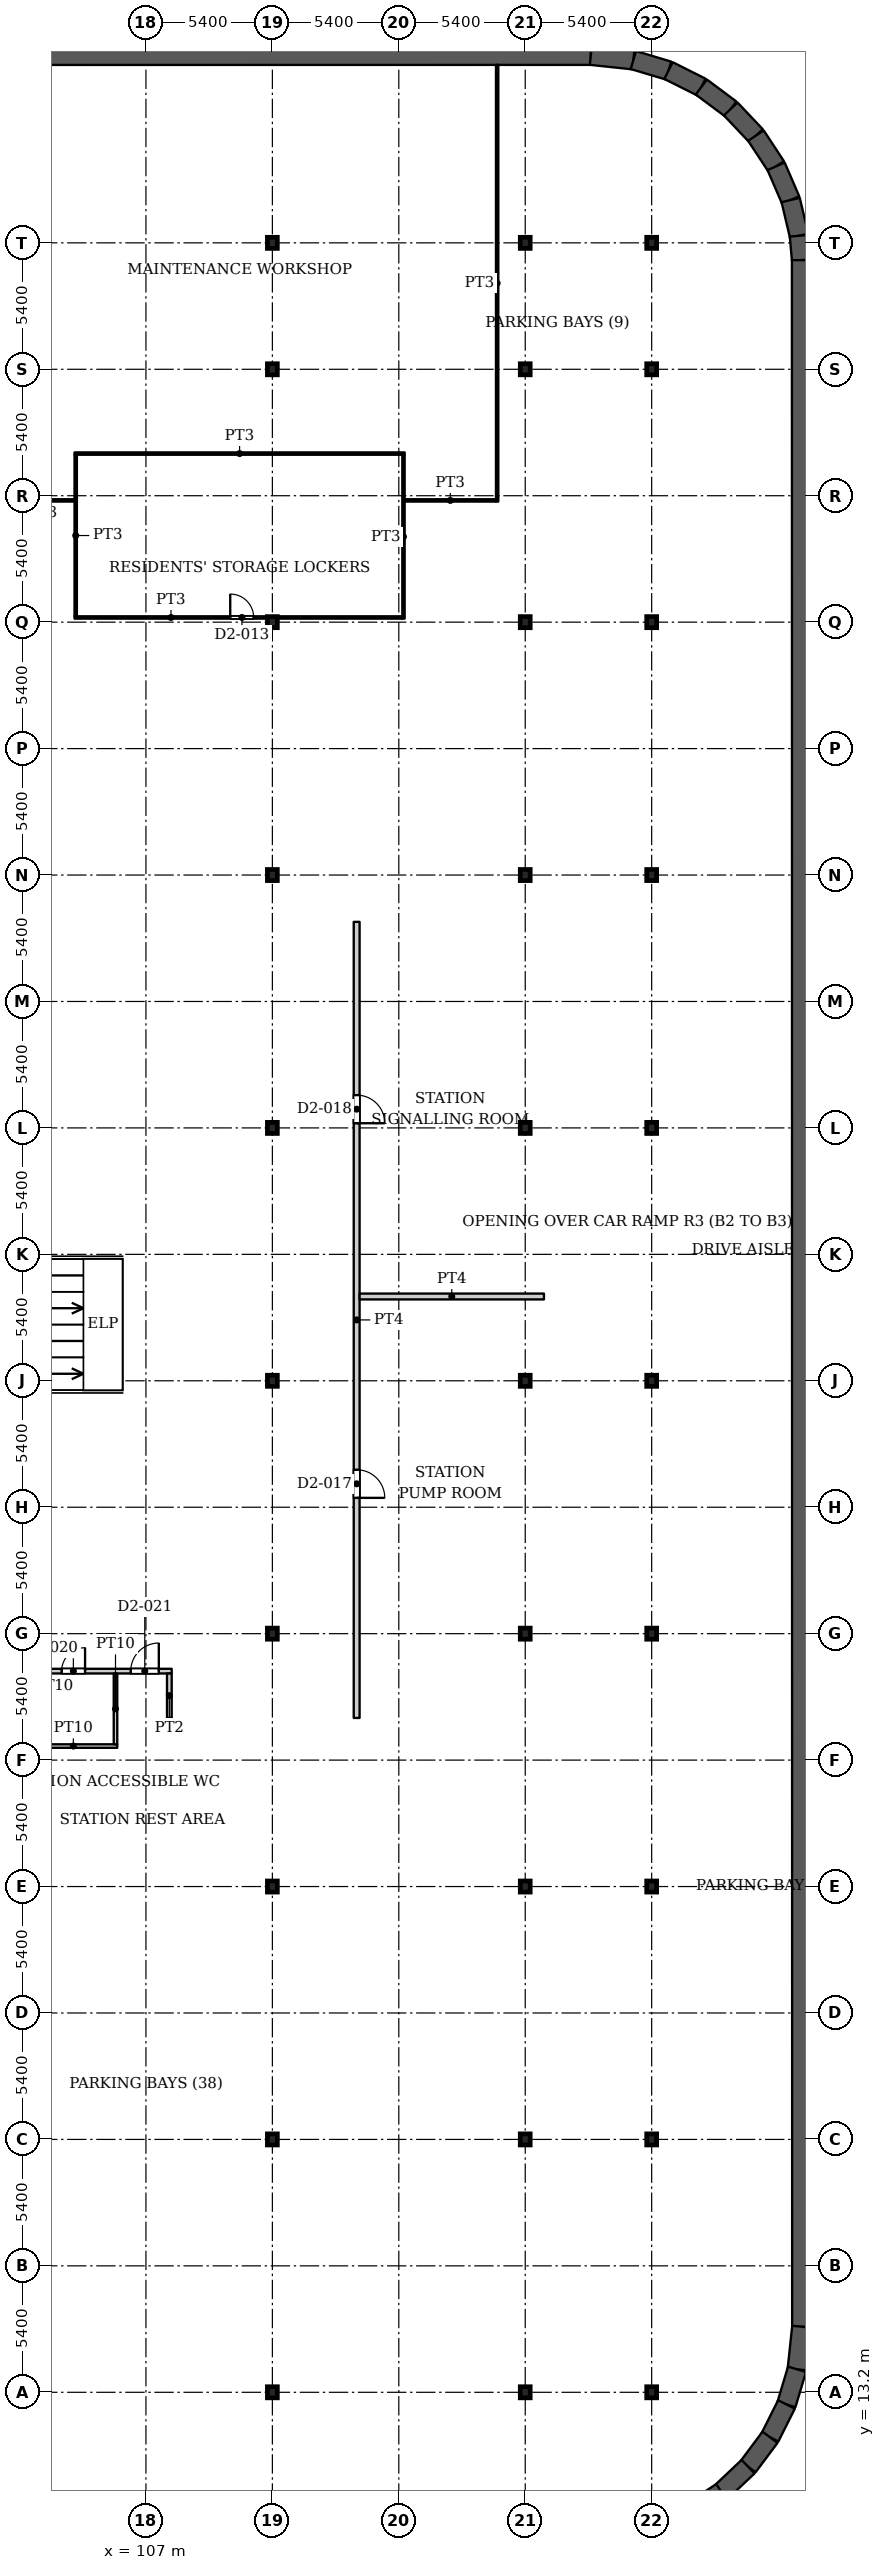
"""IFC4 building model, lengths in metres.
Left out: names, types, materials, properties, quantities, classifications, styles, units other than length and angle.
Written with IfcOpenShell. Run it as: python <this file> out.ifc"""

import sys

from ifc_helpers import new_model, si_unit, direction, frame, frame_2d, origin, origin_2d, place, context, subcontext, project, spatial, rectangle, i_section, extrude, source, transform, mapped, element, fill, save


model = new_model("IFC4")
c1 = context("Model", 3, precision=1e-05, world=origin(), true_north=direction((0.0, 1.0)))
c2 = subcontext(c1, "Body", "Model", "MODEL_VIEW")
j1 = project(units=[si_unit("LENGTHUNIT", "METRE"), si_unit("PLANEANGLEUNIT", "RADIAN")], contexts=[c1])
p1 = place(None, origin())
s1 = spatial("IfcSite", under=j1, at=p1, CompositionType="ELEMENT")
p2 = place(p1, origin())
s2 = spatial("IfcBuilding", under=s1, at=p2, CompositionType="ELEMENT")
p3 = place(p2, frame((0.0, 0.0, -10.0)))
s3 = spatial("IfcBuildingStorey", under=s2, at=p3, CompositionType="ELEMENT", Elevation=-10.0)
for number, where, z_axis, x_axis in (
    (1, (112.4, 13.2, 0.0), (0.0, 0.0, 1.0), (1.0, 0.0, 0.0)),
    (2, (123.2, 13.2, 0.0), (0.0, 0.0, 1.0), (1.0, 0.0, 0.0)),
    (3, (128.6, 13.2, 0.0), (0.0, 0.0, 1.0), (1.0, 0.0, 0.0)),
    (4, (112.4, 24.0, 0.0), (0.0, 0.0, 1.0), (1.0, 0.0, 0.0)),
    (5, (123.2, 24.0, 0.0), (0.0, 0.0, 1.0), (1.0, 0.0, 0.0)),
    (6, (128.6, 24.0, 0.0), (0.0, 0.0, 1.0), (1.0, 0.0, 0.0)),
    (7, (112.4, 34.8, 0.0), (0.0, 0.0, 1.0), (1.0, 0.0, 0.0)),
    (8, (123.2, 34.8, 0.0), (0.0, 0.0, 1.0), (1.0, 0.0, 0.0)),
    (9, (128.6, 34.8, 0.0), (0.0, 0.0, 1.0), (1.0, 0.0, 0.0)),
    (10, (112.4, 45.6, 0.0), (0.0, 0.0, 1.0), (1.0, 0.0, 0.0)),
    (11, (123.2, 45.6, 0.0), (0.0, 0.0, 1.0), (1.0, 0.0, 0.0)),
    (12, (128.6, 45.6, 0.0), (0.0, 0.0, 1.0), (1.0, 0.0, 0.0)),
    (13, (112.4, 56.4, 0.0), (0.0, 0.0, 1.0), (1.0, 0.0, 0.0)),
    (14, (123.2, 56.4, 0.0), (0.0, 0.0, 1.0), (1.0, 0.0, 0.0)),
    (15, (128.6, 56.4, 0.0), (0.0, 0.0, 1.0), (1.0, 0.0, 0.0)),
    (16, (112.4, 67.2, 0.0), (0.0, 0.0, 1.0), (1.0, 0.0, 0.0)),
    (17, (123.2, 67.2, 0.0), (0.0, 0.0, 1.0), (1.0, 0.0, 0.0)),
    (18, (128.6, 67.2, 0.0), (0.0, 0.0, 1.0), (1.0, 0.0, 0.0)),
    (19, (112.4, 78.0, 0.0), (0.0, 0.0, 1.0), (1.0, 0.0, 0.0)),
    (20, (123.2, 78.0, 0.0), (0.0, 0.0, 1.0), (1.0, 0.0, 0.0)),
    (21, (128.6, 78.0, 0.0), (0.0, 0.0, 1.0), (1.0, 0.0, 0.0)),
    (22, (112.4, 88.8, 0.0), (0.0, 0.0, 1.0), (1.0, 0.0, 0.0)),
    (23, (123.2, 88.8, 0.0), (0.0, 0.0, 1.0), (1.0, 0.0, 0.0)),
    (24, (128.6, 88.8, 0.0), (0.0, 0.0, 1.0), (1.0, 0.0, 0.0)),
    (25, (112.4, 99.6, 0.0), (0.0, 0.0, 1.0), (1.0, 0.0, 0.0)),
    (26, (123.2, 99.6, 0.0), (0.0, 0.0, 1.0), (1.0, 0.0, 0.0)),
    (27, (128.6, 99.6, 0.0), (0.0, 0.0, 1.0), (1.0, 0.0, 0.0)),
    (28, (112.4, 105.0, 0.0), (0.0, 0.0, 1.0), (1.0, 0.0, 0.0)),
    (29, (123.2, 105.0, 0.0), (0.0, 0.0, 1.0), (1.0, 0.0, 0.0)),
    (30, (128.6, 105.0, 0.0), (0.0, 0.0, 1.0), (1.0, 0.0, 0.0)),
):
    element("IfcColumn", number, at=place(p3, frame(where, z_axis=z_axis, x_axis=x_axis)), inside=s3, PredefinedType="COLUMN", context=c2, shape_type="SweptSolid", body=[
        extrude(i_section(OverallWidth=0.424, OverallDepth=0.474, WebThickness=0.048, FlangeThickness=0.077, FilletRadius=0.014, at=origin_2d()), origin(), (0.0, 0.0, 1.0), 5.0),
    ])
p4 = place(p3, frame((17.739, 112.989, 0.0), z_axis=(0.0, 0.0, 1.0), x_axis=(0.999999994851, 0.000101480029, 0.0)))
e31 = element("IfcWall", 31, at=p4, inside=s3, PredefinedType="SOLIDWALL", context=c2, shape_type="SweptSolid", body=[
    extrude(rectangle(XDim=108.261, YDim=0.8, at=frame_2d((54.13, 0.0))), origin(), (0.0, 0.0, 1.0), 5.0),
])
p5 = place(p3, frame((126.0, 113.0, 0.0), z_axis=(0.0, 0.0, 1.0), x_axis=(0.994412187849, -0.105567043429, 0.0)))
e32 = element("IfcWall", 32, at=p5, inside=s3, PredefinedType="SOLIDWALL", context=c2, shape_type="SweptSolid", body=[
    extrude(rectangle(XDim=1.829, YDim=0.8, at=frame_2d((0.915, 0.0))), origin(), (0.0, 0.0, 1.0), 5.0),
])
p6 = place(p3, frame((127.819, 112.807, 0.0), z_axis=(0.0, 0.0, 1.0), x_axis=(0.957886299092, -0.287147763375, 0.0)))
e33 = element("IfcWall", 33, at=p6, inside=s3, PredefinedType="SOLIDWALL", context=c2, shape_type="SweptSolid", body=[
    extrude(rectangle(XDim=1.567, YDim=0.8, at=frame_2d((0.783, 0.0))), origin(), (0.0, 0.0, 1.0), 5.0),
])
p7 = place(p3, frame((129.32, 112.357, 0.0), z_axis=(0.0, 0.0, 1.0), x_axis=(0.893803246399, -0.448459314462, 0.0)))
e34 = element("IfcWall", 34, at=p7, inside=s3, PredefinedType="SOLIDWALL", context=c2, shape_type="SweptSolid", body=[
    extrude(rectangle(XDim=1.567, YDim=0.8, at=frame_2d((0.784, 0.0))), origin(), (0.0, 0.0, 1.0), 5.0),
])
p8 = place(p3, frame((130.721, 111.654, 0.0), z_axis=(0.0, 0.0, 1.0), x_axis=(0.801771638905, -0.597630520512, 0.0)))
e35 = element("IfcWall", 35, at=p8, inside=s3, PredefinedType="SOLIDWALL", context=c2, shape_type="SweptSolid", body=[
    extrude(rectangle(XDim=1.568, YDim=0.8, at=frame_2d((0.784, 0.0))), origin(), (0.0, 0.0, 1.0), 5.0),
])
p9 = place(p3, frame((131.978, 110.717, 0.0), z_axis=(0.0, 0.0, 1.0), x_axis=(0.686641833089, -0.726995868662, 0.0)))
e36 = element("IfcWall", 36, at=p9, inside=s3, PredefinedType="SOLIDWALL", context=c2, shape_type="SweptSolid", body=[
    extrude(rectangle(XDim=1.567, YDim=0.8, at=frame_2d((0.783, 0.0))), origin(), (0.0, 0.0, 1.0), 5.0),
])
p10 = place(p3, frame((133.054, 109.578, 0.0), z_axis=(0.0, 0.0, 1.0), x_axis=(0.549333272834, -0.835603348101, 0.0)))
e37 = element("IfcWall", 37, at=p10, inside=s3, PredefinedType="SOLIDWALL", context=c2, shape_type="SweptSolid", body=[
    extrude(rectangle(XDim=1.568, YDim=0.8, at=frame_2d((0.784, 0.0))), origin(), (0.0, 0.0, 1.0), 5.0),
])
p11 = place(p3, frame((133.915, 108.268, 0.0), z_axis=(0.0, 0.0, 1.0), x_axis=(0.396155493925, -0.918183437355, 0.0)))
e38 = element("IfcWall", 38, at=p11, inside=s3, PredefinedType="SOLIDWALL", context=c2, shape_type="SweptSolid", body=[
    extrude(rectangle(XDim=1.567, YDim=0.8, at=frame_2d((0.784, 0.0))), origin(), (0.0, 0.0, 1.0), 5.0),
])
p12 = place(p3, frame((134.536, 106.829, 0.0), z_axis=(0.0, 0.0, 1.0), x_axis=(0.230834833469, -0.972992949439, 0.0)))
e39 = element("IfcWall", 39, at=p12, inside=s3, PredefinedType="SOLIDWALL", context=c2, shape_type="SweptSolid", body=[
    extrude(rectangle(XDim=1.569, YDim=0.8, at=frame_2d((0.784, 0.0))), origin(), (0.0, 0.0, 1.0), 5.0),
])
p13 = place(p3, frame((134.898, 105.303, 0.0), z_axis=(0.0, 0.0, 1.0), x_axis=(0.087062712427, -0.996202832813, 0.0)))
e40 = element("IfcWall", 40, at=p13, inside=s3, PredefinedType="SOLIDWALL", context=c2, shape_type="SweptSolid", body=[
    extrude(rectangle(XDim=1.046, YDim=0.8, at=frame_2d((0.523, 0.0))), origin(), (0.0, 0.0, 1.0), 5.0),
])
p14 = place(p3, frame((134.989, 104.261, 0.0), z_axis=(0.0, 0.0, 1.0), x_axis=(0.000124475473, -0.999999992253, 0.0)))
e41 = element("IfcWall", 41, at=p14, inside=s3, PredefinedType="SOLIDWALL", context=c2, shape_type="SweptSolid", body=[
    extrude(rectangle(XDim=88.261, YDim=0.8, at=frame_2d((44.13, 0.0))), origin(), (0.0, 0.0, 1.0), 5.0),
])
p15 = place(p3, frame((135.0, 16.0, 0.0), z_axis=(0.0, 0.0, 1.0), x_axis=(-0.105567043429, -0.994412187849, 0.0)))
e42 = element("IfcWall", 42, at=p15, inside=s3, PredefinedType="SOLIDWALL", context=c2, shape_type="SweptSolid", body=[
    extrude(rectangle(XDim=1.829, YDim=0.8, at=frame_2d((0.915, 0.0))), origin(), (0.0, 0.0, 1.0), 5.0),
])
p16 = place(p3, frame((134.807, 14.181, 0.0), z_axis=(0.0, 0.0, 1.0), x_axis=(-0.287147763375, -0.957886299092, 0.0)))
e43 = element("IfcWall", 43, at=p16, inside=s3, PredefinedType="SOLIDWALL", context=c2, shape_type="SweptSolid", body=[
    extrude(rectangle(XDim=1.567, YDim=0.8, at=frame_2d((0.783, 0.0))), origin(), (0.0, 0.0, 1.0), 5.0),
])
p17 = place(p3, frame((134.357, 12.68, 0.0), z_axis=(0.0, 0.0, 1.0), x_axis=(-0.448459314462, -0.893803246399, 0.0)))
e44 = element("IfcWall", 44, at=p17, inside=s3, PredefinedType="SOLIDWALL", context=c2, shape_type="SweptSolid", body=[
    extrude(rectangle(XDim=1.567, YDim=0.8, at=frame_2d((0.784, 0.0))), origin(), (0.0, 0.0, 1.0), 5.0),
])
p18 = place(p3, frame((133.654, 11.279, 0.0), z_axis=(0.0, 0.0, 1.0), x_axis=(-0.597630520512, -0.801771638905, 0.0)))
e45 = element("IfcWall", 45, at=p18, inside=s3, PredefinedType="SOLIDWALL", context=c2, shape_type="SweptSolid", body=[
    extrude(rectangle(XDim=1.568, YDim=0.8, at=frame_2d((0.784, 0.0))), origin(), (0.0, 0.0, 1.0), 5.0),
])
p19 = place(p3, frame((132.717, 10.022, 0.0), z_axis=(0.0, 0.0, 1.0), x_axis=(-0.726995868662, -0.686641833089, 0.0)))
e46 = element("IfcWall", 46, at=p19, inside=s3, PredefinedType="SOLIDWALL", context=c2, shape_type="SweptSolid", body=[
    extrude(rectangle(XDim=1.567, YDim=0.8, at=frame_2d((0.783, 0.0))), origin(), (0.0, 0.0, 1.0), 5.0),
])
p20 = place(p3, frame((131.578, 8.946, 0.0), z_axis=(0.0, 0.0, 1.0), x_axis=(-0.835603348101, -0.549333272834, 0.0)))
e47 = element("IfcWall", 47, at=p20, inside=s3, PredefinedType="SOLIDWALL", context=c2, shape_type="SweptSolid", body=[
    extrude(rectangle(XDim=1.568, YDim=0.8, at=frame_2d((0.784, 0.0))), origin(), (0.0, 0.0, 1.0), 5.0),
])
p21 = place(p3, frame((91.9, 44.0, 0.0), z_axis=(0.0, 0.0, 1.0), x_axis=(1.0, 0.0, 0.0)))
e48 = element("IfcWall", 48, at=p21, inside=s3, PredefinedType="PARTITIONING", context=c2, shape_type="SweptSolid", body=[
    extrude(rectangle(XDim=16.2, YDim=0.2, at=frame_2d((8.1, 0.0))), origin(), (0.0, 0.0, 1.0), 4.58),
])
p22 = place(p21, frame((3.5, 0.0, 0.0)))
e49 = element("IfcOpeningElement", 49, at=p22, cuts=e48, PredefinedType="OPENING", context=c2, shape_type="SweptSolid", body=[
    extrude(rectangle(XDim=1.0, YDim=2.1, at=frame_2d((0.5, 1.05))), frame((0.0, 0.11, 0.0), z_axis=(0.0, -1.0, 0.0), x_axis=(1.0, 0.0, 0.0)), (0.0, 0.0, 1.0), 0.22),
])
p23 = place(p21, frame((11.5, 0.0, 0.0)))
e50 = element("IfcOpeningElement", 50, at=p23, cuts=e48, PredefinedType="OPENING", context=c2, shape_type="SweptSolid", body=[
    extrude(rectangle(XDim=1.0, YDim=2.1, at=frame_2d((0.5, 1.05))), frame((0.0, 0.11, 0.0), z_axis=(0.0, -1.0, 0.0), x_axis=(1.0, 0.0, 0.0)), (0.0, 0.0, 1.0), 0.22),
])
p24 = place(p21, frame((14.45, 0.0, 0.0)))
e51 = element("IfcOpeningElement", 51, at=p24, cuts=e48, PredefinedType="OPENING", context=c2, shape_type="SweptSolid", body=[
    extrude(rectangle(XDim=1.2, YDim=2.1, at=frame_2d((0.6, 1.05))), frame((0.0, 0.11, 0.0), z_axis=(0.0, -1.0, 0.0), x_axis=(1.0, 0.0, 0.0)), (0.0, 0.0, 1.0), 0.22),
])
p25 = place(p3, frame((100.125, 94.0, 0.0), z_axis=(0.0, 0.0, 1.0), x_axis=(1.0, 0.0, 0.0)))
e52 = element("IfcWall", 52, at=p25, inside=s3, PredefinedType="PARTITIONING", context=c2, shape_type="SweptSolid", body=[
    extrude(rectangle(XDim=3.825, YDim=0.1, at=frame_2d((1.913, 0.0))), origin(), (0.0, 0.0, 1.0), 4.58),
])
p26 = place(p3, frame((102.025, 40.8, 0.0), z_axis=(0.0, 0.0, 1.0), x_axis=(1.0, 0.0, 0.0)))
e53 = element("IfcWall", 53, at=p26, inside=s3, PredefinedType="PARTITIONING", context=c2, shape_type="SweptSolid", body=[
    extrude(rectangle(XDim=3.75, YDim=0.15, at=frame_2d((1.875, 0.0))), origin(), (0.0, 0.0, 1.0), 4.58),
])
p27 = place(p3, frame((103.95, 89.0, 0.0), z_axis=(0.0, 0.0, 1.0), x_axis=(1.0, 0.0, 0.0)))
e54 = element("IfcWall", 54, at=p27, inside=s3, PredefinedType="PARTITIONING", context=c2, shape_type="SweptSolid", body=[
    extrude(rectangle(XDim=8.239, YDim=0.1, at=frame_2d((4.12, 0.0))), origin(), (0.0, 0.0, 1.0), 4.58),
])
p28 = place(p27, frame((6.65, 0.0, 0.0)))
e55 = element("IfcOpeningElement", 55, at=p28, cuts=e54, PredefinedType="OPENING", context=c2, shape_type="SweptSolid", body=[
    extrude(rectangle(XDim=1.0, YDim=2.1, at=frame_2d((0.5, 1.05))), frame((0.0, 0.06, 0.0), z_axis=(0.0, -1.0, 0.0), x_axis=(1.0, 0.0, 0.0)), (0.0, 0.0, 1.0), 0.12),
])
p29 = place(p3, frame((103.95, 96.0, 0.0), z_axis=(0.0, 0.0, 1.0), x_axis=(1.0, 0.0, 0.0)))
e56 = element("IfcWall", 56, at=p29, inside=s3, PredefinedType="PARTITIONING", context=c2, shape_type="SweptSolid", body=[
    extrude(rectangle(XDim=14.1, YDim=0.1, at=frame_2d((7.05, 0.0))), origin(), (0.0, 0.0, 1.0), 4.58),
])
p30 = place(p3, frame((104.0, 89.05, 0.0), z_axis=(0.0, 0.0, 1.0), x_axis=(0.0, 1.0, 0.0)))
e57 = element("IfcWall", 57, at=p30, inside=s3, PredefinedType="PARTITIONING", context=c2, shape_type="SweptSolid", body=[
    extrude(rectangle(XDim=6.9, YDim=0.1, at=frame_2d((3.45, 0.0))), origin(), (0.0, 0.0, 1.0), 4.58),
])
p31 = place(p3, frame((105.7, 40.875, 0.0), z_axis=(0.0, 0.0, 1.0), x_axis=(0.0, 1.0, 0.0)))
e58 = element("IfcWall", 58, at=p31, inside=s3, PredefinedType="PARTITIONING", context=c2, shape_type="SweptSolid", body=[
    extrude(rectangle(XDim=3.025, YDim=0.15, at=frame_2d((1.512, 0.0))), origin(), (0.0, 0.0, 1.0), 4.58),
])
p32 = place(p3, frame((108.0, 42.0, 0.0), z_axis=(0.0, 0.0, 1.0), x_axis=(0.0, 1.0, 0.0)))
e59 = element("IfcWall", 59, at=p32, inside=s3, PredefinedType="PARTITIONING", context=c2, shape_type="SweptSolid", body=[
    extrude(rectangle(XDim=1.9, YDim=0.2, at=frame_2d((0.95, 0.0))), origin(), (0.0, 0.0, 1.0), 4.58),
])
p33 = place(p3, frame((112.611, 89.0, 0.0), z_axis=(0.0, 0.0, 1.0), x_axis=(1.0, 0.0, 0.0)))
e60 = element("IfcWall", 60, at=p33, inside=s3, PredefinedType="PARTITIONING", context=c2, shape_type="SweptSolid", body=[
    extrude(rectangle(XDim=5.339, YDim=0.1, at=frame_2d((2.669, 0.0))), origin(), (0.0, 0.0, 1.0), 4.58),
])
p34 = place(p3, frame((116.0, 42.0, 0.0), z_axis=(0.0, 0.0, 1.0), x_axis=(0.0, 1.0, 0.0)))
e61 = element("IfcWall", 61, at=p34, inside=s3, PredefinedType="PARTITIONING", context=c2, shape_type="SweptSolid", body=[
    extrude(rectangle(XDim=34.0, YDim=0.25, at=frame_2d((17.0, 0.0))), origin(), (0.0, 0.0, 1.0), 4.58),
])
p35 = place(p34, frame((9.4, 0.0, 0.0)))
e62 = element("IfcOpeningElement", 62, at=p35, cuts=e61, PredefinedType="OPENING", context=c2, shape_type="SweptSolid", body=[
    extrude(rectangle(XDim=1.2, YDim=2.1, at=frame_2d((0.6, 1.05))), frame((0.0, 0.135, 0.0), z_axis=(0.0, -1.0, 0.0), x_axis=(1.0, 0.0, 0.0)), (0.0, 0.0, 1.0), 0.27),
])
p36 = place(p34, frame((25.4, 0.0, 0.0)))
e63 = element("IfcOpeningElement", 63, at=p36, cuts=e61, PredefinedType="OPENING", context=c2, shape_type="SweptSolid", body=[
    extrude(rectangle(XDim=1.2, YDim=2.1, at=frame_2d((0.6, 1.05))), frame((0.0, 0.135, 0.0), z_axis=(0.0, -1.0, 0.0), x_axis=(1.0, 0.0, 0.0)), (0.0, 0.0, 1.0), 0.27),
])
p37 = place(p3, frame((116.125, 60.0, 0.0), z_axis=(0.0, 0.0, 1.0), x_axis=(1.0, 0.0, 0.0)))
e64 = element("IfcWall", 64, at=p37, inside=s3, PredefinedType="PARTITIONING", context=c2, shape_type="SweptSolid", body=[
    extrude(rectangle(XDim=7.875, YDim=0.25, at=frame_2d((3.938, 0.0))), origin(), (0.0, 0.0, 1.0), 4.58),
])
p38 = place(p3, frame((118.0, 88.95, 0.0), z_axis=(0.0, 0.0, 1.0), x_axis=(0.0, 1.0, 0.0)))
e65 = element("IfcWall", 65, at=p38, inside=s3, PredefinedType="PARTITIONING", context=c2, shape_type="SweptSolid", body=[
    extrude(rectangle(XDim=7.0, YDim=0.1, at=frame_2d((3.5, 0.0))), origin(), (0.0, 0.0, 1.0), 4.58),
])
p39 = place(p3, frame((118.05, 94.0, 0.0), z_axis=(0.0, 0.0, 1.0), x_axis=(1.0, 0.0, 0.0)))
e66 = element("IfcWall", 66, at=p39, inside=s3, PredefinedType="PARTITIONING", context=c2, shape_type="SweptSolid", body=[
    extrude(rectangle(XDim=3.9, YDim=0.1, at=frame_2d((1.95, 0.0))), origin(), (0.0, 0.0, 1.0), 4.58),
])
p40 = place(p3, frame((122.0, 93.95, 0.0), z_axis=(0.0, 0.0, 1.0), x_axis=(0.0, 1.0, 0.0)))
e67 = element("IfcWall", 67, at=p40, inside=s3, PredefinedType="PARTITIONING", context=c2, shape_type="SweptSolid", body=[
    extrude(rectangle(XDim=18.651, YDim=0.1, at=frame_2d((9.326, 0.0))), origin(), (0.0, 0.0, 1.0), 4.58),
])
m1 = source(origin(), c2, "Body", "SweptSolid", [
    extrude(rectangle(XDim=1.0, YDim=2.1, at=frame_2d((0.5, 1.05))), frame((0.0, 0.025, 0.0), z_axis=(0.0, -1.0, 0.0), x_axis=(1.0, 0.0, 0.0)), (0.0, 0.0, 1.0), 0.05),
])
p41 = place(p28, origin())
e68 = element("IfcDoor", 68, at=p41, inside=s3, OperationType="SINGLE_SWING_LEFT", PredefinedType="DOOR", context=c2, shape_type="MappedRepresentation", body=[
    mapped(m1, transform((0.0, 0.0, 0.0), x_axis=(1.0, 0.0, 0.0), y_axis=(0.0, 1.0, 0.0), z_axis=(0.0, 0.0, 1.0), scale=1.0)),
])
fill(e55, e68)
m2 = source(origin(), c2, "Body", "SweptSolid", [
    extrude(rectangle(XDim=1.2, YDim=2.1, at=frame_2d((0.6, 1.05))), frame((0.0, 0.025, 0.0), z_axis=(0.0, -1.0, 0.0), x_axis=(1.0, 0.0, 0.0)), (0.0, 0.0, 1.0), 0.05),
])
p42 = place(p35, origin())
e69 = element("IfcDoor", 69, at=p42, inside=s3, OperationType="SINGLE_SWING_RIGHT", PredefinedType="DOOR", context=c2, shape_type="MappedRepresentation", body=[
    mapped(m2, transform((0.0, 0.0, 0.0), x_axis=(1.0, 0.0, 0.0), y_axis=(0.0, 1.0, 0.0), z_axis=(0.0, 0.0, 1.0), scale=1.0)),
])
fill(e62, e69)
p43 = place(p36, origin())
e70 = element("IfcDoor", 70, at=p43, inside=s3, OperationType="SINGLE_SWING_RIGHT", PredefinedType="DOOR", context=c2, shape_type="MappedRepresentation", body=[
    mapped(m2, transform((0.0, 0.0, 0.0), x_axis=(1.0, 0.0, 0.0), y_axis=(0.0, 1.0, 0.0), z_axis=(0.0, 0.0, 1.0), scale=1.0)),
])
fill(e63, e70)
m3 = source(origin(), c2, "Body", "SweptSolid", [
    extrude(rectangle(XDim=1.0, YDim=2.1, at=frame_2d((0.5, 1.05))), frame((0.0, 0.025, 0.0), z_axis=(0.0, -1.0, 0.0), x_axis=(1.0, 0.0, 0.0)), (0.0, 0.0, 1.0), 0.05),
])
p44 = place(p23, origin())
e71 = element("IfcDoor", 71, at=p44, inside=s3, OperationType="SINGLE_SWING_LEFT", PredefinedType="DOOR", context=c2, shape_type="MappedRepresentation", body=[
    mapped(m3, transform((0.0, 0.0, 0.0), x_axis=(1.0, 0.0, 0.0), y_axis=(0.0, 1.0, 0.0), z_axis=(0.0, 0.0, 1.0), scale=1.0)),
])
fill(e50, e71)
m4 = source(origin(), c2, "Body", "SweptSolid", [
    extrude(rectangle(XDim=1.2, YDim=2.1, at=frame_2d((0.6, 1.05))), frame((0.0, 0.025, 0.0), z_axis=(0.0, -1.0, 0.0), x_axis=(1.0, 0.0, 0.0)), (0.0, 0.0, 1.0), 0.05),
])
p45 = place(p24, origin())
e72 = element("IfcDoor", 72, at=p45, inside=s3, OperationType="SINGLE_SWING_LEFT", PredefinedType="DOOR", context=c2, shape_type="MappedRepresentation", body=[
    mapped(m4, transform((0.0, 0.0, 0.0), x_axis=(1.0, 0.0, 0.0), y_axis=(0.0, 1.0, 0.0), z_axis=(0.0, 0.0, 1.0), scale=1.0)),
])
fill(e51, e72)
save(model, sys.argv[1])
